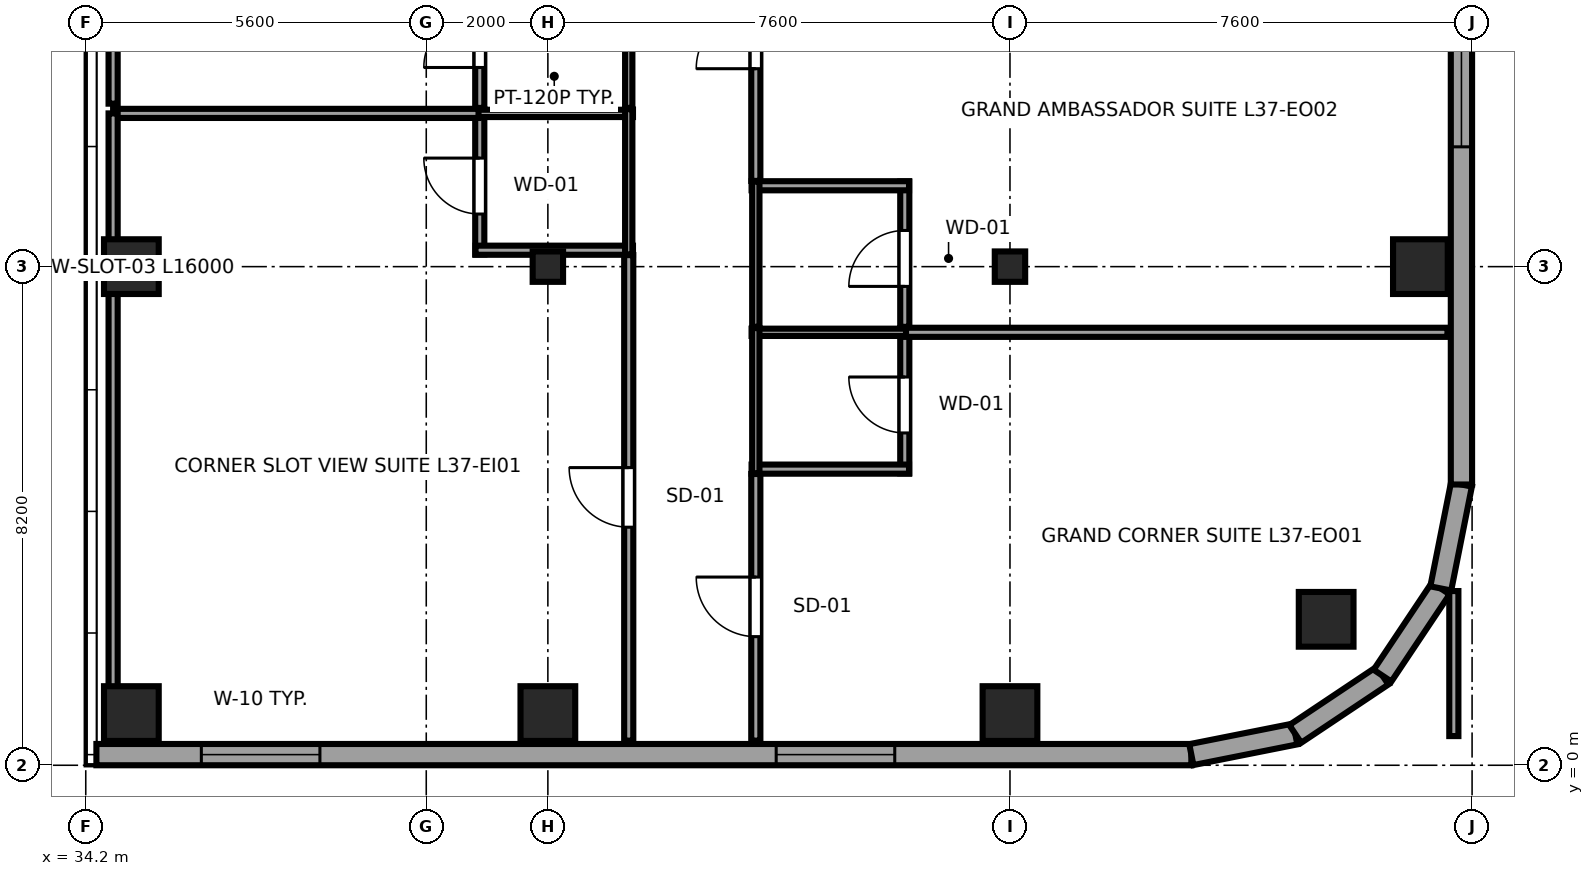
"""IFC4 building model, lengths in metres.
Left out: names, types, materials, properties, quantities, classifications, styles, units other than length and angle.
Written with IfcOpenShell. Run it as: python <this file> out.ifc"""

import sys

from ifc_helpers import new_model, si_unit, direction, frame, frame_2d, origin, origin_2d, place, context, subcontext, project, spatial, rectangle, i_section, extrude, source, transform, mapped, element, fill, save


model = new_model("IFC4")
c1 = context("Model", 3, precision=1e-05, world=origin(), true_north=direction((0.0, 1.0)))
c2 = subcontext(c1, "Body", "Model", "MODEL_VIEW")
j1 = project(units=[si_unit("LENGTHUNIT", "METRE"), si_unit("PLANEANGLEUNIT", "RADIAN")], contexts=[c1])
p1 = place(None, origin())
s1 = spatial("IfcSite", under=j1, at=p1, CompositionType="ELEMENT")
p2 = place(p1, origin())
s2 = spatial("IfcBuilding", under=s1, at=p2, CompositionType="ELEMENT")
p3 = place(p2, frame((0.0, 0.0, 143.5)))
s3 = spatial("IfcBuildingStorey", under=s2, at=p3, CompositionType="ELEMENT", Elevation=143.5)
m1 = source(origin(), c2, "Body", "SweptSolid", [
    extrude(rectangle(XDim=0.9, YDim=0.9, at=origin_2d()), origin(), (0.0, 0.0, 1.0), 3.55),
])
for number, where, z_axis, x_axis in (
    (1, (34.95, 0.85, 0.0), (0.0, 0.0, 1.0), (1.0, 0.0, 0.0)),
    (2, (34.95, 8.2, 0.0), (0.0, 0.0, 1.0), (1.0, 0.0, 0.0)),
    (3, (41.8, 0.85, 0.0), (0.0, 0.0, 1.0), (1.0, 0.0, 0.0)),
):
    element("IfcColumn", number, at=place(p3, frame(where, z_axis=z_axis, x_axis=x_axis)), inside=s3, PredefinedType="COLUMN", context=c2, shape_type="MappedRepresentation", body=[
        mapped(m1, transform((0.0, 0.0, 0.0), x_axis=(1.0, 0.0, 0.0), y_axis=(0.0, 1.0, 0.0), z_axis=(0.0, 0.0, 1.0), scale=1.0)),
    ])
m2 = source(origin(), c2, "Body", "SweptSolid", [
    extrude(i_section(OverallWidth=0.5, OverallDepth=0.5, WebThickness=0.022, FlangeThickness=0.034, at=origin_2d()), origin(), (0.0, 0.0, 1.0), 3.55),
])
p4 = place(p3, frame((41.8, 8.2, 0.0), z_axis=(0.0, 0.0, 1.0), x_axis=(1.0, 0.0, 0.0)))
e4 = element("IfcColumn", 4, at=p4, inside=s3, PredefinedType="COLUMN", context=c2, shape_type="MappedRepresentation", body=[
    mapped(m2, transform((0.0, 0.0, 0.0), x_axis=(1.0, 0.0, 0.0), y_axis=(0.0, 1.0, 0.0), z_axis=(0.0, 0.0, 1.0), scale=1.0)),
])
p5 = place(p3, frame((49.4, 0.85, 0.0), z_axis=(0.0, 0.0, 1.0), x_axis=(1.0, 0.0, 0.0)))
e5 = element("IfcColumn", 5, at=p5, inside=s3, PredefinedType="COLUMN", context=c2, shape_type="MappedRepresentation", body=[
    mapped(m1, transform((0.0, 0.0, 0.0), x_axis=(1.0, 0.0, 0.0), y_axis=(0.0, 1.0, 0.0), z_axis=(0.0, 0.0, 1.0), scale=1.0)),
])
p6 = place(p3, frame((49.4, 8.2, 0.0), z_axis=(0.0, 0.0, 1.0), x_axis=(1.0, 0.0, 0.0)))
e6 = element("IfcColumn", 6, at=p6, inside=s3, PredefinedType="COLUMN", context=c2, shape_type="MappedRepresentation", body=[
    mapped(m2, transform((0.0, 0.0, 0.0), x_axis=(1.0, 0.0, 0.0), y_axis=(0.0, 1.0, 0.0), z_axis=(0.0, 0.0, 1.0), scale=1.0)),
])
for number, where, z_axis, x_axis in (
    (7, (54.6, 2.4, 0.0), (0.0, 0.0, 1.0), (1.0, 0.0, 0.0)),
    (8, (56.15, 8.2, 0.0), (0.0, 0.0, 1.0), (1.0, 0.0, 0.0)),
):
    element("IfcColumn", number, at=place(p3, frame(where, z_axis=z_axis, x_axis=x_axis)), inside=s3, PredefinedType="COLUMN", context=c2, shape_type="MappedRepresentation", body=[
        mapped(m1, transform((0.0, 0.0, 0.0), x_axis=(1.0, 0.0, 0.0), y_axis=(0.0, 1.0, 0.0), z_axis=(0.0, 0.0, 1.0), scale=1.0)),
    ])
p7 = place(p3, frame((34.375, 0.175, 0.0), z_axis=(0.0, 0.0, 1.0), x_axis=(1.0, 0.0, 0.0)))
e9 = element("IfcWall", 9, at=p7, inside=s3, PredefinedType="SOLIDWALL", context=c2, shape_type="SweptSolid", body=[
    extrude(rectangle(XDim=18.008, YDim=0.35, at=frame_2d((9.004, 0.0))), origin(), (0.0, 0.0, 1.0), 3.29),
])
p8 = place(p7, frame((1.726, 0.0, 0.68)))
e10 = element("IfcOpeningElement", 10, at=p8, cuts=e9, PredefinedType="OPENING", context=c2, shape_type="SweptSolid", body=[
    extrude(rectangle(XDim=1.95, YDim=1.82, at=frame_2d((0.975, 0.91))), frame((0.0, 0.185, 0.0), z_axis=(0.0, -1.0, 0.0), x_axis=(1.0, 0.0, 0.0)), (0.0, 0.0, 1.0), 0.37),
])
p9 = place(p7, frame((11.18, 0.0, 0.68)))
e11 = element("IfcOpeningElement", 11, at=p9, cuts=e9, PredefinedType="OPENING", context=c2, shape_type="SweptSolid", body=[
    extrude(rectangle(XDim=1.95, YDim=1.82, at=frame_2d((0.975, 0.91))), frame((0.0, 0.185, 0.0), z_axis=(0.0, -1.0, 0.0), x_axis=(1.0, 0.0, 0.0)), (0.0, 0.0, 1.0), 0.37),
])
p10 = place(p3, frame((52.383, 0.175, 0.0), z_axis=(0.0, 0.0, 1.0), x_axis=(0.980800971659, 0.195011420161, 0.0)))
e12 = element("IfcWall", 12, at=p10, inside=s3, PredefinedType="SOLIDWALL", context=c2, shape_type="SweptSolid", body=[
    extrude(rectangle(XDim=1.743, YDim=0.35, at=frame_2d((0.871, 0.0))), origin(), (0.0, 0.0, 1.0), 3.29),
])
p11 = place(p3, frame((54.092, 0.515, 0.0), z_axis=(0.0, 0.0, 1.0), x_axis=(0.831483840845, 0.55554893791, 0.0)))
e13 = element("IfcWall", 13, at=p11, inside=s3, PredefinedType="SOLIDWALL", context=c2, shape_type="SweptSolid", body=[
    extrude(rectangle(XDim=1.725, YDim=0.35, at=frame_2d((0.863, 0.0))), origin(), (0.0, 0.0, 1.0), 3.29),
])
p12 = place(p3, frame((55.527, 1.473, 0.0), z_axis=(0.0, 0.0, 1.0), x_axis=(0.55554893791, 0.831483840845, 0.0)))
e14 = element("IfcWall", 14, at=p12, inside=s3, PredefinedType="SOLIDWALL", context=c2, shape_type="SweptSolid", body=[
    extrude(rectangle(XDim=1.725, YDim=0.35, at=frame_2d((0.863, 0.0))), origin(), (0.0, 0.0, 1.0), 2.08),
])
p13 = place(p3, frame((56.485, 2.908, 0.0), z_axis=(0.0, 0.0, 1.0), x_axis=(0.195011420161, 0.980800971659, 0.0)))
e15 = element("IfcWall", 15, at=p13, inside=s3, PredefinedType="SOLIDWALL", context=c2, shape_type="SweptSolid", body=[
    extrude(rectangle(XDim=1.743, YDim=0.35, at=frame_2d((0.871, 0.0))), origin(), (0.0, 0.0, 1.0), 2.08),
])
p14 = place(p3, frame((56.825, 4.617, 0.0), z_axis=(0.0, 0.0, 1.0), x_axis=(0.0, 1.0, 0.0)))
e16 = element("IfcWall", 16, at=p14, inside=s3, PredefinedType="SOLIDWALL", context=c2, shape_type="SweptSolid", body=[
    extrude(rectangle(XDim=36.766, YDim=0.35, at=frame_2d((18.383, 0.0))), origin(), (0.0, 0.0, 1.0), 3.29),
])
p15 = place(p14, frame((5.553, 0.0, 0.68)))
e17 = element("IfcOpeningElement", 17, at=p15, cuts=e16, PredefinedType="OPENING", context=c2, shape_type="SweptSolid", body=[
    extrude(rectangle(XDim=1.95, YDim=1.82, at=frame_2d((0.975, 0.91))), frame((0.0, 0.185, 0.0), z_axis=(0.0, -1.0, 0.0), x_axis=(1.0, 0.0, 0.0)), (0.0, 0.0, 1.0), 0.37),
])
p16 = place(p14, frame((13.456, 0.0, 0.68)))
e18 = element("IfcOpeningElement", 18, at=p16, cuts=e16, PredefinedType="OPENING", context=c2, shape_type="SweptSolid", body=[
    extrude(rectangle(XDim=1.95, YDim=1.82, at=frame_2d((0.975, 0.91))), frame((0.0, 0.185, 0.0), z_axis=(0.0, -1.0, 0.0), x_axis=(1.0, 0.0, 0.0)), (0.0, 0.0, 1.0), 0.37),
])
p17 = place(p14, frame((21.36, 0.0, 0.68)))
e19 = element("IfcOpeningElement", 19, at=p17, cuts=e16, PredefinedType="OPENING", context=c2, shape_type="SweptSolid", body=[
    extrude(rectangle(XDim=1.95, YDim=1.82, at=frame_2d((0.975, 0.91))), frame((0.0, 0.185, 0.0), z_axis=(0.0, -1.0, 0.0), x_axis=(1.0, 0.0, 0.0)), (0.0, 0.0, 1.0), 0.37),
])
p18 = place(p14, frame((30.313, 0.0, 0.68)))
e20 = element("IfcOpeningElement", 20, at=p18, cuts=e16, PredefinedType="OPENING", context=c2, shape_type="SweptSolid", body=[
    extrude(rectangle(XDim=1.95, YDim=1.82, at=frame_2d((0.975, 0.91))), frame((0.0, 0.185, 0.0), z_axis=(0.0, -1.0, 0.0), x_axis=(1.0, 0.0, 0.0)), (0.0, 0.0, 1.0), 0.37),
])
p19 = place(p3, frame((40.68, 8.4, 0.0), z_axis=(0.0, 0.0, 1.0), x_axis=(0.0, 1.0, 0.0)))
e21 = element("IfcWall", 21, at=p19, inside=s3, PredefinedType="PARTITIONING", context=c2, shape_type="SweptSolid", body=[
    extrude(rectangle(XDim=2.39, YDim=0.15, at=frame_2d((1.195, 0.0))), origin(), (0.0, 0.0, 1.0), 3.29),
])
p20 = place(p19, frame((0.665, 0.0, 0.0)))
e22 = element("IfcOpeningElement", 22, at=p20, cuts=e21, PredefinedType="OPENING", context=c2, shape_type="SweptSolid", body=[
    extrude(rectangle(XDim=0.92, YDim=2.01, at=frame_2d((0.46, 1.005))), frame((0.0, 0.085, 0.0), z_axis=(0.0, -1.0, 0.0), x_axis=(1.0, 0.0, 0.0)), (0.0, 0.0, 1.0), 0.17),
])
p21 = place(p3, frame((40.61, 8.47, 0.0), z_axis=(0.0, 0.0, 1.0), x_axis=(1.0, 0.0, 0.0)))
e23 = element("IfcWall", 23, at=p21, inside=s3, PredefinedType="PARTITIONING", context=c2, shape_type="SweptSolid", body=[
    extrude(rectangle(XDim=2.59, YDim=0.15, at=frame_2d((1.295, 0.0))), origin(), (0.0, 0.0, 1.0), 2.08),
])
p22 = place(p3, frame((40.61, 10.72, 0.0), z_axis=(0.0, 0.0, 1.0), x_axis=(1.0, 0.0, 0.0)))
e24 = element("IfcWall", 24, at=p22, inside=s3, PredefinedType="PLUMBINGWALL", context=c2, shape_type="SweptSolid", body=[
    extrude(rectangle(XDim=2.59, YDim=0.12, at=frame_2d((1.295, 0.0))), origin(), (0.0, 0.0, 1.0), 3.29),
])
p23 = place(p3, frame((43.13, 8.4, 0.0), z_axis=(0.0, 0.0, 1.0), x_axis=(0.0, 1.0, 0.0)))
e25 = element("IfcWall", 25, at=p23, inside=s3, PredefinedType="PLUMBINGWALL", context=c2, shape_type="SweptSolid", body=[
    extrude(rectangle(XDim=2.39, YDim=0.12, at=frame_2d((1.195, 0.0))), origin(), (0.0, 0.0, 1.0), 3.29),
])
p24 = place(p3, frame((40.68, 10.81, 0.0), z_axis=(0.0, 0.0, 1.0), x_axis=(0.0, 1.0, 0.0)))
e26 = element("IfcWall", 26, at=p24, inside=s3, PredefinedType="PARTITIONING", context=c2, shape_type="SweptSolid", body=[
    extrude(rectangle(XDim=2.39, YDim=0.15, at=frame_2d((1.195, 0.0))), origin(), (0.0, 0.0, 1.0), 3.29),
])
p25 = place(p24, frame((0.665, 0.0, 0.0)))
e27 = element("IfcOpeningElement", 27, at=p25, cuts=e26, PredefinedType="OPENING", context=c2, shape_type="SweptSolid", body=[
    extrude(rectangle(XDim=0.92, YDim=2.01, at=frame_2d((0.46, 1.005))), frame((0.0, 0.085, 0.0), z_axis=(0.0, -1.0, 0.0), x_axis=(1.0, 0.0, 0.0)), (0.0, 0.0, 1.0), 0.17),
])
p26 = place(p3, frame((43.13, 10.81, 0.0), z_axis=(0.0, 0.0, 1.0), x_axis=(0.0, 1.0, 0.0)))
e28 = element("IfcWall", 28, at=p26, inside=s3, PredefinedType="PLUMBINGWALL", context=c2, shape_type="SweptSolid", body=[
    extrude(rectangle(XDim=2.39, YDim=0.12, at=frame_2d((1.195, 0.0))), origin(), (0.0, 0.0, 1.0), 3.29),
])
p27 = place(p3, frame((47.67, 4.8, 0.0), z_axis=(0.0, 0.0, 1.0), x_axis=(0.0, 1.0, 0.0)))
e29 = element("IfcWall", 29, at=p27, inside=s3, PredefinedType="PARTITIONING", context=c2, shape_type="SweptSolid", body=[
    extrude(rectangle(XDim=2.39, YDim=0.15, at=frame_2d((1.195, 0.0))), origin(), (0.0, 0.0, 1.0), 3.29),
])
p28 = place(p27, frame((0.665, 0.0, 0.0)))
e30 = element("IfcOpeningElement", 30, at=p28, cuts=e29, PredefinedType="OPENING", context=c2, shape_type="SweptSolid", body=[
    extrude(rectangle(XDim=0.92, YDim=2.01, at=frame_2d((0.46, 1.005))), frame((0.0, 0.085, 0.0), z_axis=(0.0, -1.0, 0.0), x_axis=(1.0, 0.0, 0.0)), (0.0, 0.0, 1.0), 0.17),
])
p29 = place(p3, frame((45.15, 4.87, 0.0), z_axis=(0.0, 0.0, 1.0), x_axis=(1.0, 0.0, 0.0)))
e31 = element("IfcWall", 31, at=p29, inside=s3, PredefinedType="PARTITIONING", context=c2, shape_type="SweptSolid", body=[
    extrude(rectangle(XDim=2.59, YDim=0.15, at=frame_2d((1.295, 0.0))), origin(), (0.0, 0.0, 1.0), 3.29),
])
p30 = place(p3, frame((45.15, 7.12, 0.0), z_axis=(0.0, 0.0, 1.0), x_axis=(1.0, 0.0, 0.0)))
e32 = element("IfcWall", 32, at=p30, inside=s3, PredefinedType="PLUMBINGWALL", context=c2, shape_type="SweptSolid", body=[
    extrude(rectangle(XDim=2.59, YDim=0.12, at=frame_2d((1.295, 0.0))), origin(), (0.0, 0.0, 1.0), 3.29),
])
p31 = place(p3, frame((45.22, 4.8, 0.0), z_axis=(0.0, 0.0, 1.0), x_axis=(0.0, 1.0, 0.0)))
e33 = element("IfcWall", 33, at=p31, inside=s3, PredefinedType="PLUMBINGWALL", context=c2, shape_type="SweptSolid", body=[
    extrude(rectangle(XDim=2.39, YDim=0.12, at=frame_2d((1.195, 0.0))), origin(), (0.0, 0.0, 1.0), 3.29),
])
p32 = place(p3, frame((47.67, 7.21, 0.0), z_axis=(0.0, 0.0, 1.0), x_axis=(0.0, 1.0, 0.0)))
e34 = element("IfcWall", 34, at=p32, inside=s3, PredefinedType="PARTITIONING", context=c2, shape_type="SweptSolid", body=[
    extrude(rectangle(XDim=2.39, YDim=0.15, at=frame_2d((1.195, 0.0))), origin(), (0.0, 0.0, 1.0), 3.29),
])
p33 = place(p32, frame((0.665, 0.0, 0.0)))
e35 = element("IfcOpeningElement", 35, at=p33, cuts=e34, PredefinedType="OPENING", context=c2, shape_type="SweptSolid", body=[
    extrude(rectangle(XDim=0.92, YDim=2.01, at=frame_2d((0.46, 1.005))), frame((0.0, 0.085, 0.0), z_axis=(0.0, -1.0, 0.0), x_axis=(1.0, 0.0, 0.0)), (0.0, 0.0, 1.0), 0.17),
])
p34 = place(p3, frame((45.15, 9.53, 0.0), z_axis=(0.0, 0.0, 1.0), x_axis=(1.0, 0.0, 0.0)))
e36 = element("IfcWall", 36, at=p34, inside=s3, PredefinedType="PARTITIONING", context=c2, shape_type="SweptSolid", body=[
    extrude(rectangle(XDim=2.59, YDim=0.15, at=frame_2d((1.295, 0.0))), origin(), (0.0, 0.0, 1.0), 3.29),
])
p35 = place(p3, frame((45.22, 7.21, 0.0), z_axis=(0.0, 0.0, 1.0), x_axis=(0.0, 1.0, 0.0)))
e37 = element("IfcWall", 37, at=p35, inside=s3, PredefinedType="PLUMBINGWALL", context=c2, shape_type="SweptSolid", body=[
    extrude(rectangle(XDim=2.39, YDim=0.12, at=frame_2d((1.195, 0.0))), origin(), (0.0, 0.0, 1.0), 3.29),
])
p36 = place(p3, frame((43.13, 0.405, 0.0), z_axis=(0.0, 0.0, 1.0), x_axis=(0.0, 1.0, 0.0)))
e38 = element("IfcWall", 38, at=p36, inside=s3, PredefinedType="PARTITIONING", context=c2, shape_type="SweptSolid", body=[
    extrude(rectangle(XDim=7.985, YDim=0.15, at=frame_2d((3.992, 0.0))), origin(), (0.0, 0.0, 1.0), 3.29),
])
p37 = place(p36, frame((3.51, 0.0, 0.0)))
e39 = element("IfcOpeningElement", 39, at=p37, cuts=e38, PredefinedType="OPENING", context=c2, shape_type="SweptSolid", body=[
    extrude(rectangle(XDim=0.98, YDim=2.12, at=frame_2d((0.49, 1.06))), frame((0.0, 0.085, 0.0), z_axis=(0.0, -1.0, 0.0), x_axis=(1.0, 0.0, 0.0)), (0.0, 0.0, 1.0), 0.17),
])
p38 = place(p3, frame((34.65, 10.72, 0.0), z_axis=(0.0, 0.0, 1.0), x_axis=(1.0, 0.0, 0.0)))
e40 = element("IfcWall", 40, at=p38, inside=s3, PredefinedType="PARTITIONING", context=c2, shape_type="SweptSolid", body=[
    extrude(rectangle(XDim=6.01, YDim=0.15, at=frame_2d((3.005, 0.0))), origin(), (0.0, 0.0, 1.0), 3.29),
])
p39 = place(p3, frame((34.65, 0.405, 0.0), z_axis=(0.0, 0.0, 1.0), x_axis=(0.0, 1.0, 0.0)))
e41 = element("IfcWall", 41, at=p39, inside=s3, PredefinedType="PARTITIONING", context=c2, shape_type="SweptSolid", body=[
    extrude(rectangle(XDim=10.315, YDim=0.15, at=frame_2d((5.157, 0.0))), origin(), (0.0, 0.0, 1.0), 2.08),
])
p40 = place(p3, frame((34.65, 10.88, 0.0), z_axis=(0.0, 0.0, 1.0), x_axis=(0.0, 1.0, 0.0)))
e42 = element("IfcWall", 42, at=p40, inside=s3, PredefinedType="PARTITIONING", context=c2, shape_type="SweptSolid", body=[
    extrude(rectangle(XDim=10.54, YDim=0.15, at=frame_2d((5.27, 0.0))), origin(), (0.0, 0.0, 1.0), 2.08),
])
p41 = place(p3, frame((45.22, 0.405, 0.0), z_axis=(0.0, 0.0, 1.0), x_axis=(0.0, 1.0, 0.0)))
e43 = element("IfcWall", 43, at=p41, inside=s3, PredefinedType="PARTITIONING", context=c2, shape_type="SweptSolid", body=[
    extrude(rectangle(XDim=4.385, YDim=0.15, at=frame_2d((2.192, 0.0))), origin(), (0.0, 0.0, 1.0), 3.29),
])
p42 = place(p41, frame((1.71, 0.0, 0.0)))
e44 = element("IfcOpeningElement", 44, at=p42, cuts=e43, PredefinedType="OPENING", context=c2, shape_type="SweptSolid", body=[
    extrude(rectangle(XDim=0.98, YDim=2.12, at=frame_2d((0.49, 1.06))), frame((0.0, 0.085, 0.0), z_axis=(0.0, -1.0, 0.0), x_axis=(1.0, 0.0, 0.0)), (0.0, 0.0, 1.0), 0.17),
])
p43 = place(p3, frame((56.7, 0.48, 0.0), z_axis=(0.0, 0.0, 1.0), x_axis=(0.0, 1.0, 0.0)))
e45 = element("IfcWall", 45, at=p43, inside=s3, PredefinedType="PARTITIONING", context=c2, shape_type="SweptSolid", body=[
    extrude(rectangle(XDim=2.385, YDim=0.15, at=frame_2d((1.192, 0.0))), origin(), (0.0, 0.0, 1.0), 3.29),
])
p44 = place(p3, frame((47.69, 7.12, 0.0), z_axis=(0.0, 0.0, 1.0), x_axis=(1.0, 0.0, 0.0)))
e46 = element("IfcWall", 46, at=p44, inside=s3, PredefinedType="PARTITIONING", context=c2, shape_type="SweptSolid", body=[
    extrude(rectangle(XDim=8.905, YDim=0.15, at=frame_2d((4.453, 0.0))), origin(), (0.0, 0.0, 1.0), 3.29),
])
p45 = place(p3, frame((45.22, 9.61, 0.0), z_axis=(0.0, 0.0, 1.0), x_axis=(0.0, 1.0, 0.0)))
e47 = element("IfcWall", 47, at=p45, inside=s3, PredefinedType="PARTITIONING", context=c2, shape_type="SweptSolid", body=[
    extrude(rectangle(XDim=4.71, YDim=0.15, at=frame_2d((2.355, 0.0))), origin(), (0.0, 0.0, 1.0), 3.29),
])
p46 = place(p45, frame((1.845, 0.0, 0.0)))
e48 = element("IfcOpeningElement", 48, at=p46, cuts=e47, PredefinedType="OPENING", context=c2, shape_type="SweptSolid", body=[
    extrude(rectangle(XDim=0.98, YDim=2.12, at=frame_2d((0.49, 1.06))), frame((0.0, 0.085, 0.0), z_axis=(0.0, -1.0, 0.0), x_axis=(1.0, 0.0, 0.0)), (0.0, 0.0, 1.0), 0.17),
])
m3 = source(origin(), c2, "Body", "SweptSolid", [
    extrude(rectangle(XDim=1.95, YDim=1.82, at=frame_2d((0.975, 0.91))), frame((0.0, 0.09, 0.0), z_axis=(0.0, -1.0, 0.0), x_axis=(1.0, 0.0, 0.0)), (0.0, 0.0, 1.0), 0.06),
])
p47 = place(p8, origin())
e49 = element("IfcWindow", 49, at=p47, inside=s3, PartitioningType="DOUBLE_PANEL_VERTICAL", PredefinedType="WINDOW", context=c2, shape_type="MappedRepresentation", body=[
    mapped(m3, transform((0.0, 0.0, 0.0), x_axis=(1.0, 0.0, 0.0), y_axis=(0.0, 1.0, 0.0), z_axis=(0.0, 0.0, 1.0), scale=1.0)),
])
fill(e10, e49)
p48 = place(p9, origin())
e50 = element("IfcWindow", 50, at=p48, inside=s3, PartitioningType="DOUBLE_PANEL_VERTICAL", PredefinedType="WINDOW", context=c2, shape_type="MappedRepresentation", body=[
    mapped(m3, transform((0.0, 0.0, 0.0), x_axis=(1.0, 0.0, 0.0), y_axis=(0.0, 1.0, 0.0), z_axis=(0.0, 0.0, 1.0), scale=1.0)),
])
fill(e11, e50)
p49 = place(p15, origin())
e51 = element("IfcWindow", 51, at=p49, inside=s3, PartitioningType="DOUBLE_PANEL_VERTICAL", PredefinedType="WINDOW", context=c2, shape_type="MappedRepresentation", body=[
    mapped(m3, transform((0.0, 0.0, 0.0), x_axis=(1.0, 0.0, 0.0), y_axis=(0.0, 1.0, 0.0), z_axis=(0.0, 0.0, 1.0), scale=1.0)),
])
fill(e17, e51)
m4 = source(origin(), c2, "Body", "SweptSolid", [
    extrude(rectangle(XDim=0.92, YDim=2.01, at=frame_2d((0.46, 1.005))), frame((0.0, 0.025, 0.0), z_axis=(0.0, -1.0, 0.0), x_axis=(1.0, 0.0, 0.0)), (0.0, 0.0, 1.0), 0.05),
])
p50 = place(p20, origin())
e52 = element("IfcDoor", 52, at=p50, inside=s3, OperationType="SINGLE_SWING_RIGHT", PredefinedType="DOOR", context=c2, shape_type="MappedRepresentation", body=[
    mapped(m4, transform((0.0, 0.0, 0.0), x_axis=(1.0, 0.0, 0.0), y_axis=(0.0, 1.0, 0.0), z_axis=(0.0, 0.0, 1.0), scale=1.0)),
])
fill(e22, e52)
p51 = place(p25, origin())
e53 = element("IfcDoor", 53, at=p51, inside=s3, OperationType="SINGLE_SWING_LEFT", PredefinedType="DOOR", context=c2, shape_type="MappedRepresentation", body=[
    mapped(m4, transform((0.0, 0.0, 0.0), x_axis=(1.0, 0.0, 0.0), y_axis=(0.0, 1.0, 0.0), z_axis=(0.0, 0.0, 1.0), scale=1.0)),
])
fill(e27, e53)
p52 = place(p28, origin())
e54 = element("IfcDoor", 54, at=p52, inside=s3, OperationType="SINGLE_SWING_RIGHT", PredefinedType="DOOR", context=c2, shape_type="MappedRepresentation", body=[
    mapped(m4, transform((0.0, 0.0, 0.0), x_axis=(1.0, 0.0, 0.0), y_axis=(0.0, 1.0, 0.0), z_axis=(0.0, 0.0, 1.0), scale=1.0)),
])
fill(e30, e54)
p53 = place(p33, origin())
e55 = element("IfcDoor", 55, at=p53, inside=s3, OperationType="SINGLE_SWING_LEFT", PredefinedType="DOOR", context=c2, shape_type="MappedRepresentation", body=[
    mapped(m4, transform((0.0, 0.0, 0.0), x_axis=(1.0, 0.0, 0.0), y_axis=(0.0, 1.0, 0.0), z_axis=(0.0, 0.0, 1.0), scale=1.0)),
])
fill(e35, e55)
m5 = source(origin(), c2, "Body", "SweptSolid", [
    extrude(rectangle(XDim=0.98, YDim=2.12, at=frame_2d((0.49, 1.06))), frame((0.0, 0.025, 0.0), z_axis=(0.0, -1.0, 0.0), x_axis=(1.0, 0.0, 0.0)), (0.0, 0.0, 1.0), 0.05),
])
p54 = place(p37, origin())
e56 = element("IfcDoor", 56, at=p54, inside=s3, OperationType="SINGLE_SWING_RIGHT", PredefinedType="DOOR", context=c2, shape_type="MappedRepresentation", body=[
    mapped(m5, transform((0.0, 0.0, 0.0), x_axis=(1.0, 0.0, 0.0), y_axis=(0.0, 1.0, 0.0), z_axis=(0.0, 0.0, 1.0), scale=1.0)),
])
fill(e39, e56)
p55 = place(p42, origin())
e57 = element("IfcDoor", 57, at=p55, inside=s3, OperationType="SINGLE_SWING_RIGHT", PredefinedType="DOOR", context=c2, shape_type="MappedRepresentation", body=[
    mapped(m5, transform((0.0, 0.0, 0.0), x_axis=(1.0, 0.0, 0.0), y_axis=(0.0, 1.0, 0.0), z_axis=(0.0, 0.0, 1.0), scale=1.0)),
])
fill(e44, e57)
p56 = place(p46, origin())
e58 = element("IfcDoor", 58, at=p56, inside=s3, OperationType="SINGLE_SWING_LEFT", PredefinedType="DOOR", context=c2, shape_type="MappedRepresentation", body=[
    mapped(m5, transform((0.0, 0.0, 0.0), x_axis=(1.0, 0.0, 0.0), y_axis=(0.0, 1.0, 0.0), z_axis=(0.0, 0.0, 1.0), scale=1.0)),
])
fill(e48, e58)
save(model, sys.argv[1])
